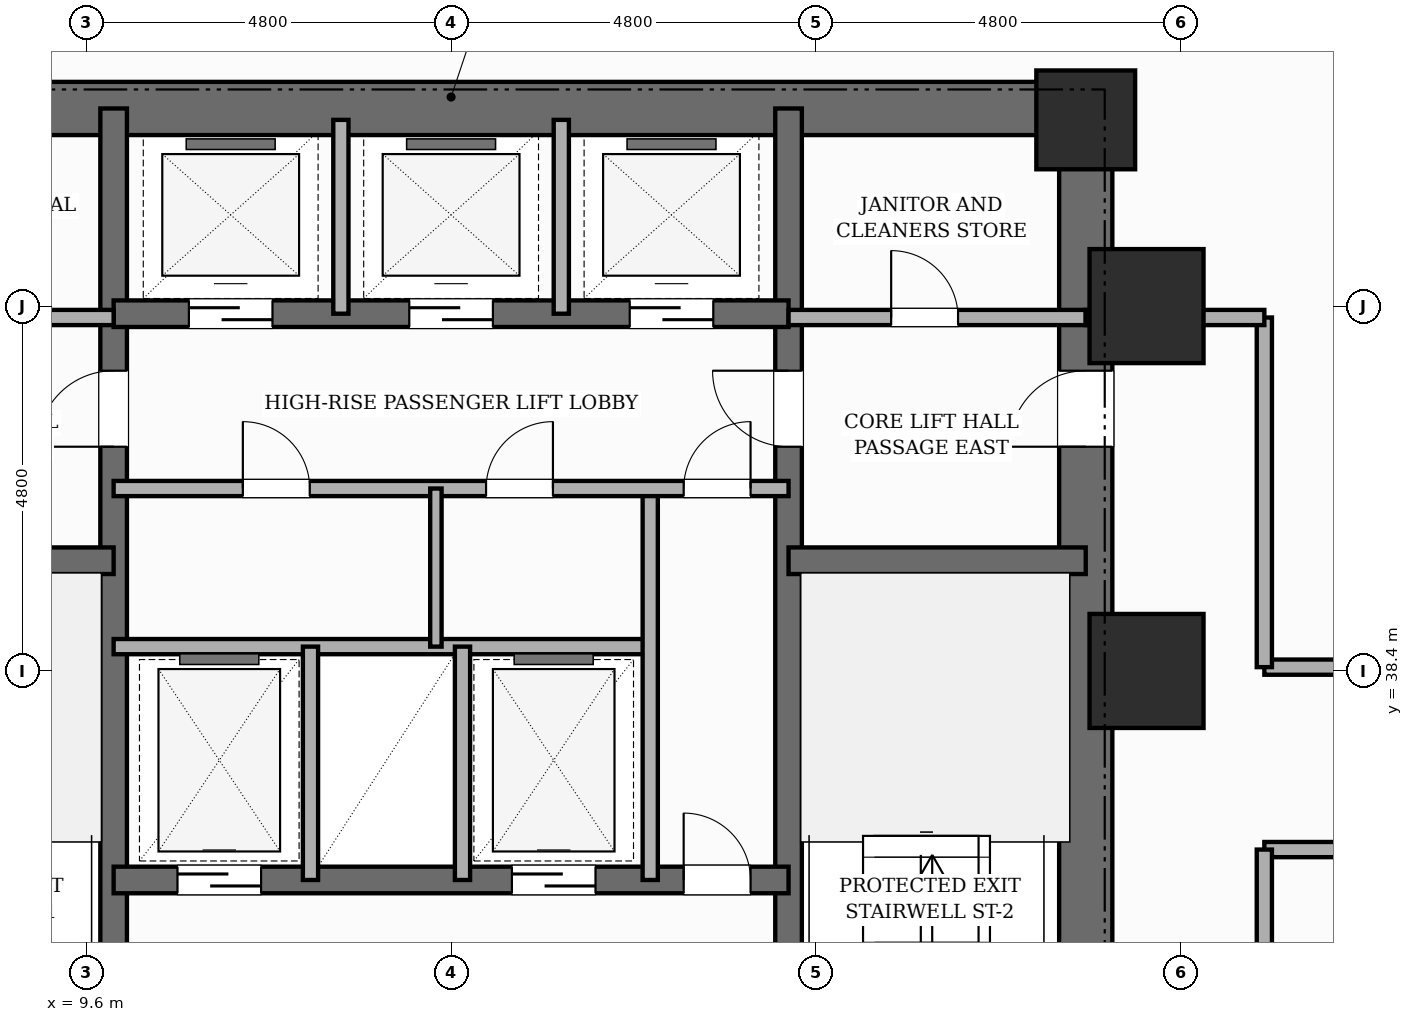
"""IFC4 building model, lengths in metres.
Left out: names, types, materials, properties, quantities, classifications, styles, units other than length and angle.
Written with IfcOpenShell. Run it as: python <this file> out.ifc"""

import sys

from ifc_helpers import new_model, si_unit, direction, frame, frame_2d, origin, origin_2d, place, context, subcontext, project, spatial, rectangle, extrude, element, fill, save


model = new_model("IFC4")
c1 = context("Model", 3, precision=1e-05, world=origin(), true_north=direction((0.0, 1.0)))
c2 = subcontext(c1, "Body", "Model", "MODEL_VIEW")
j1 = project(units=[si_unit("LENGTHUNIT", "METRE"), si_unit("PLANEANGLEUNIT", "RADIAN")], contexts=[c1])
p1 = place(None, origin())
s1 = spatial("IfcSite", under=j1, at=p1, CompositionType="ELEMENT")
p2 = place(p1, origin())
s2 = spatial("IfcBuilding", under=s1, at=p2, CompositionType="ELEMENT")
p3 = place(p2, frame((0.0, 0.0, -8.8)))
s3 = spatial("IfcBuildingStorey", under=s2, at=p3, CompositionType="ELEMENT", Elevation=-8.8)
p4 = place(p3, frame((22.75, 30.55, 0.0), z_axis=(0.0, 0.0, 1.0), x_axis=(0.0, 1.0, 0.0)))
e1 = element("IfcWall", 1, at=p4, inside=s3, PredefinedType="SHEAR", context=c2, shape_type="SweptSolid", body=[
    extrude(rectangle(XDim=15.6, YDim=0.7, at=frame_2d((7.8, 0.0))), origin(), (0.0, 0.0, 1.0), 4.4),
])
p5 = place(p4, frame((10.8, 0.0, 0.0)))
e2 = element("IfcOpeningElement", 2, at=p5, cuts=e1, PredefinedType="OPENING", context=c2, shape_type="SweptSolid", body=[
    extrude(rectangle(XDim=1.0, YDim=2.15, at=frame_2d((0.5, 1.075))), frame((0.0, 0.36, 0.0), z_axis=(0.0, -1.0, 0.0), x_axis=(1.0, 0.0, 0.0)), (0.0, 0.0, 1.0), 0.72),
])
p6 = place(p3, frame((6.05, 45.8, 0.0), z_axis=(0.0, 0.0, 1.0), x_axis=(1.0, 0.0, 0.0)))
e3 = element("IfcWall", 3, at=p6, inside=s3, PredefinedType="SHEAR", context=c2, shape_type="SweptSolid", body=[
    extrude(rectangle(XDim=16.7, YDim=0.7, at=frame_2d((8.35, 0.0))), origin(), (0.0, 0.0, 1.0), 4.4),
])
p7 = place(p3, frame((9.96, 30.9, 0.0), z_axis=(0.0, 0.0, 1.0), x_axis=(0.0, 1.0, 0.0)))
e4 = element("IfcWall", 4, at=p7, inside=s3, PredefinedType="SHEAR", context=c2, shape_type="SweptSolid", body=[
    extrude(rectangle(XDim=14.9, YDim=0.35, at=frame_2d((7.45, 0.0))), origin(), (0.0, 0.0, 1.0), 4.4),
])
p8 = place(p7, frame((0.65, 0.0, 0.0)))
e5 = element("IfcOpeningElement", 5, at=p8, cuts=e4, PredefinedType="OPENING", context=c2, shape_type="SweptSolid", body=[
    extrude(rectangle(XDim=0.95, YDim=2.1, at=frame_2d((0.475, 1.05))), frame((0.0, 0.185, 0.0), z_axis=(0.0, -1.0, 0.0), x_axis=(1.0, 0.0, 0.0)), (0.0, 0.0, 1.0), 0.37),
])
p9 = place(p7, frame((10.45, 0.0, 0.0)))
e6 = element("IfcOpeningElement", 6, at=p9, cuts=e4, PredefinedType="OPENING", context=c2, shape_type="SweptSolid", body=[
    extrude(rectangle(XDim=1.0, YDim=2.15, at=frame_2d((0.5, 1.075))), frame((0.0, 0.185, 0.0), z_axis=(0.0, -1.0, 0.0), x_axis=(1.0, 0.0, 0.0)), (0.0, 0.0, 1.0), 0.37),
])
p10 = place(p3, frame((18.84, 30.9, 0.0), z_axis=(0.0, 0.0, 1.0), x_axis=(0.0, 1.0, 0.0)))
e7 = element("IfcWall", 7, at=p10, inside=s3, PredefinedType="SHEAR", context=c2, shape_type="SweptSolid", body=[
    extrude(rectangle(XDim=14.9, YDim=0.35, at=frame_2d((7.45, 0.0))), origin(), (0.0, 0.0, 1.0), 4.4),
])
p11 = place(p10, frame((0.65, 0.0, 0.0)))
e8 = element("IfcOpeningElement", 8, at=p11, cuts=e7, PredefinedType="OPENING", context=c2, shape_type="SweptSolid", body=[
    extrude(rectangle(XDim=0.95, YDim=2.1, at=frame_2d((0.475, 1.05))), frame((0.0, 0.185, 0.0), z_axis=(0.0, -1.0, 0.0), x_axis=(1.0, 0.0, 0.0)), (0.0, 0.0, 1.0), 0.37),
])
p12 = place(p10, frame((10.45, 0.0, 0.0)))
e9 = element("IfcOpeningElement", 9, at=p12, cuts=e7, PredefinedType="OPENING", context=c2, shape_type="SweptSolid", body=[
    extrude(rectangle(XDim=1.0, YDim=2.15, at=frame_2d((0.5, 1.075))), frame((0.0, 0.185, 0.0), z_axis=(0.0, -1.0, 0.0), x_axis=(1.0, 0.0, 0.0)), (0.0, 0.0, 1.0), 0.37),
])
for number, where, z_axis, x_axis in (
    (10, (6.05, 39.85, 0.0), (0.0, 0.0, 1.0), (1.0, 0.0, 0.0)),
    (11, (18.84, 39.85, 0.0), (0.0, 0.0, 1.0), (1.0, 0.0, 0.0)),
):
    element("IfcWall", number, at=place(p3, frame(where, z_axis=z_axis, x_axis=x_axis)), inside=s3, PredefinedType="SHEAR", context=c2, shape_type="SweptSolid", body=[
        extrude(rectangle(XDim=3.91, YDim=0.35, at=frame_2d((1.955, 0.0))), origin(), (0.0, 0.0, 1.0), 4.4),
    ])
p13 = place(p3, frame((9.96, 35.65, 0.0), z_axis=(0.0, 0.0, 1.0), x_axis=(1.0, 0.0, 0.0)))
e12 = element("IfcWall", 12, at=p13, inside=s3, PredefinedType="SHEAR", context=c2, shape_type="SweptSolid", body=[
    extrude(rectangle(XDim=8.88, YDim=0.35, at=frame_2d((4.44, 0.0))), origin(), (0.0, 0.0, 1.0), 4.4),
])
p14 = place(p13, frame((0.84, 0.0, 0.0)))
e13 = element("IfcOpeningElement", 13, at=p14, cuts=e12, PredefinedType="OPENING", context=c2, shape_type="SweptSolid", body=[
    extrude(rectangle(XDim=1.1, YDim=2.15, at=frame_2d((0.55, 1.075))), frame((0.0, 0.185, 0.0), z_axis=(0.0, -1.0, 0.0), x_axis=(1.0, 0.0, 0.0)), (0.0, 0.0, 1.0), 0.37),
])
p15 = place(p13, frame((5.24, 0.0, 0.0)))
e14 = element("IfcOpeningElement", 14, at=p15, cuts=e12, PredefinedType="OPENING", context=c2, shape_type="SweptSolid", body=[
    extrude(rectangle(XDim=1.1, YDim=2.15, at=frame_2d((0.55, 1.075))), frame((0.0, 0.185, 0.0), z_axis=(0.0, -1.0, 0.0), x_axis=(1.0, 0.0, 0.0)), (0.0, 0.0, 1.0), 0.37),
])
p16 = place(p13, frame((7.5, 0.0, 0.0)))
e15 = element("IfcOpeningElement", 15, at=p16, cuts=e12, PredefinedType="OPENING", context=c2, shape_type="SweptSolid", body=[
    extrude(rectangle(XDim=0.88, YDim=2.1, at=frame_2d((0.44, 1.05))), frame((0.0, 0.185, 0.0), z_axis=(0.0, -1.0, 0.0), x_axis=(1.0, 0.0, 0.0)), (0.0, 0.0, 1.0), 0.37),
])
p17 = place(p3, frame((9.96, 43.1, 0.0), z_axis=(0.0, 0.0, 1.0), x_axis=(1.0, 0.0, 0.0)))
e16 = element("IfcWall", 16, at=p17, inside=s3, PredefinedType="SHEAR", context=c2, shape_type="SweptSolid", body=[
    extrude(rectangle(XDim=8.88, YDim=0.35, at=frame_2d((4.44, 0.0))), origin(), (0.0, 0.0, 1.0), 4.4),
])
p18 = place(p17, frame((0.99, 0.0, 0.0)))
e17 = element("IfcOpeningElement", 17, at=p18, cuts=e16, PredefinedType="OPENING", context=c2, shape_type="SweptSolid", body=[
    extrude(rectangle(XDim=1.1, YDim=2.15, at=frame_2d((0.55, 1.075))), frame((0.0, 0.185, 0.0), z_axis=(0.0, -1.0, 0.0), x_axis=(1.0, 0.0, 0.0)), (0.0, 0.0, 1.0), 0.37),
])
p19 = place(p17, frame((3.89, 0.0, 0.0)))
e18 = element("IfcOpeningElement", 18, at=p19, cuts=e16, PredefinedType="OPENING", context=c2, shape_type="SweptSolid", body=[
    extrude(rectangle(XDim=1.1, YDim=2.15, at=frame_2d((0.55, 1.075))), frame((0.0, 0.185, 0.0), z_axis=(0.0, -1.0, 0.0), x_axis=(1.0, 0.0, 0.0)), (0.0, 0.0, 1.0), 0.37),
])
p20 = place(p17, frame((6.79, 0.0, 0.0)))
e19 = element("IfcOpeningElement", 19, at=p20, cuts=e16, PredefinedType="OPENING", context=c2, shape_type="SweptSolid", body=[
    extrude(rectangle(XDim=1.1, YDim=2.15, at=frame_2d((0.55, 1.075))), frame((0.0, 0.185, 0.0), z_axis=(0.0, -1.0, 0.0), x_axis=(1.0, 0.0, 0.0)), (0.0, 0.0, 1.0), 0.37),
])
p21 = place(p3, frame((22.75, 45.65, 0.0), z_axis=(0.0, 0.0, 1.0), x_axis=(1.0, 0.0, 0.0)))
e20 = element("IfcColumn", 20, at=p21, inside=s3, PredefinedType="COLUMN", context=c2, shape_type="SweptSolid", body=[
    extrude(rectangle(XDim=1.3, YDim=1.3, at=origin_2d()), origin(), (0.0, 0.0, 1.0), 4.4),
])
for number, where, z_axis, x_axis in (
    (21, (23.55, 38.4, 0.0), (0.0, 0.0, 1.0), (1.0, 0.0, 0.0)),
    (22, (23.55, 43.2, 0.0), (0.0, 0.0, 1.0), (1.0, 0.0, 0.0)),
):
    element("IfcColumn", number, at=place(p3, frame(where, z_axis=z_axis, x_axis=x_axis)), inside=s3, PredefinedType="USERDEFINED", context=c2, shape_type="SweptSolid", body=[
        extrude(rectangle(XDim=1.5, YDim=1.5, at=origin_2d()), origin(), (0.0, 0.0, 1.0), 4.4),
    ])
p22 = place(p3, frame((9.96, 38.72, 0.0), z_axis=(0.0, 0.0, 1.0), x_axis=(1.0, 0.0, 0.0)))
e23 = element("IfcWall", 23, at=p22, inside=s3, PredefinedType="POLYGONAL", context=c2, shape_type="SweptSolid", body=[
    extrude(rectangle(XDim=7.06, YDim=0.2, at=frame_2d((3.53, 0.0))), origin(), (0.0, 0.0, 1.0), 4.08),
])
for number, where, z_axis, x_axis in (
    (24, (12.55, 35.65, 0.0), (0.0, 0.0, 1.0), (0.0, 1.0, 0.0)),
    (25, (14.55, 35.65, 0.0), (0.0, 0.0, 1.0), (0.0, 1.0, 0.0)),
):
    element("IfcWall", number, at=place(p3, frame(where, z_axis=z_axis, x_axis=x_axis)), inside=s3, PredefinedType="POLYGONAL", context=c2, shape_type="SweptSolid", body=[
        extrude(rectangle(XDim=3.07, YDim=0.2, at=frame_2d((1.535, 0.0))), origin(), (0.0, 0.0, 1.0), 4.08),
    ])
p23 = place(p3, frame((17.02, 35.65, 0.0), z_axis=(0.0, 0.0, 1.0), x_axis=(0.0, 1.0, 0.0)))
e26 = element("IfcWall", 26, at=p23, inside=s3, PredefinedType="POLYGONAL", context=c2, shape_type="SweptSolid", body=[
    extrude(rectangle(XDim=5.15, YDim=0.2, at=frame_2d((2.575, 0.0))), origin(), (0.0, 0.0, 1.0), 4.08),
])
p24 = place(p3, frame((9.96, 40.8, 0.0), z_axis=(0.0, 0.0, 1.0), x_axis=(1.0, 0.0, 0.0)))
e27 = element("IfcWall", 27, at=p24, inside=s3, PredefinedType="POLYGONAL", context=c2, shape_type="SweptSolid", body=[
    extrude(rectangle(XDim=8.88, YDim=0.2, at=frame_2d((4.44, 0.0))), origin(), (0.0, 0.0, 1.0), 4.08),
])
p25 = place(p24, frame((7.5, 0.0, 0.0)))
e28 = element("IfcOpeningElement", 28, at=p25, cuts=e27, PredefinedType="OPENING", context=c2, shape_type="SweptSolid", body=[
    extrude(rectangle(XDim=0.88, YDim=2.1, at=frame_2d((0.44, 1.05))), frame((0.0, 0.11, 0.0), z_axis=(0.0, -1.0, 0.0), x_axis=(1.0, 0.0, 0.0)), (0.0, 0.0, 1.0), 0.22),
])
p26 = place(p24, frame((1.7, 0.0, 0.0)))
e29 = element("IfcOpeningElement", 29, at=p26, cuts=e27, PredefinedType="OPENING", context=c2, shape_type="SweptSolid", body=[
    extrude(rectangle(XDim=0.88, YDim=2.1, at=frame_2d((0.44, 1.05))), frame((0.0, 0.11, 0.0), z_axis=(0.0, -1.0, 0.0), x_axis=(1.0, 0.0, 0.0)), (0.0, 0.0, 1.0), 0.22),
])
p27 = place(p24, frame((4.9, 0.0, 0.0)))
e30 = element("IfcOpeningElement", 30, at=p27, cuts=e27, PredefinedType="OPENING", context=c2, shape_type="SweptSolid", body=[
    extrude(rectangle(XDim=0.88, YDim=2.1, at=frame_2d((0.44, 1.05))), frame((0.0, 0.11, 0.0), z_axis=(0.0, -1.0, 0.0), x_axis=(1.0, 0.0, 0.0)), (0.0, 0.0, 1.0), 0.22),
])
p28 = place(p3, frame((18.84, 43.05, 0.0), z_axis=(0.0, 0.0, 1.0), x_axis=(1.0, 0.0, 0.0)))
e31 = element("IfcWall", 31, at=p28, inside=s3, PredefinedType="POLYGONAL", context=c2, shape_type="SweptSolid", body=[
    extrude(rectangle(XDim=3.91, YDim=0.2, at=frame_2d((1.955, 0.0))), origin(), (0.0, 0.0, 1.0), 3.28),
])
p29 = place(p28, frame((1.35, 0.0, 0.0)))
e32 = element("IfcOpeningElement", 32, at=p29, cuts=e31, PredefinedType="OPENING", context=c2, shape_type="SweptSolid", body=[
    extrude(rectangle(XDim=0.88, YDim=2.1, at=frame_2d((0.44, 1.05))), frame((0.0, 0.11, 0.0), z_axis=(0.0, -1.0, 0.0), x_axis=(1.0, 0.0, 0.0)), (0.0, 0.0, 1.0), 0.22),
])
p30 = place(p3, frame((6.05, 43.05, 0.0), z_axis=(0.0, 0.0, 1.0), x_axis=(1.0, 0.0, 0.0)))
e33 = element("IfcWall", 33, at=p30, inside=s3, PredefinedType="POLYGONAL", context=c2, shape_type="SweptSolid", body=[
    extrude(rectangle(XDim=3.91, YDim=0.2, at=frame_2d((1.955, 0.0))), origin(), (0.0, 0.0, 1.0), 3.28),
])
p31 = place(p30, frame((1.35, 0.0, 0.0)))
e34 = element("IfcOpeningElement", 34, at=p31, cuts=e33, PredefinedType="OPENING", context=c2, shape_type="SweptSolid", body=[
    extrude(rectangle(XDim=0.88, YDim=2.1, at=frame_2d((0.44, 1.05))), frame((0.0, 0.11, 0.0), z_axis=(0.0, -1.0, 0.0), x_axis=(1.0, 0.0, 0.0)), (0.0, 0.0, 1.0), 0.22),
])
for number, where, z_axis, x_axis in (
    (35, (12.95, 43.1, 0.0), (0.0, 0.0, 1.0), (0.0, 1.0, 0.0)),
    (36, (15.85, 43.1, 0.0), (0.0, 0.0, 1.0), (0.0, 1.0, 0.0)),
):
    element("IfcWall", number, at=place(p3, frame(where, z_axis=z_axis, x_axis=x_axis)), inside=s3, PredefinedType="POLYGONAL", context=c2, shape_type="SweptSolid", body=[
        extrude(rectangle(XDim=2.55, YDim=0.2, at=frame_2d((1.275, 0.0))), origin(), (0.0, 0.0, 1.0), 4.08),
    ])
p32 = place(p3, frame((14.2, 38.72, 0.0), z_axis=(0.0, 0.0, 1.0), x_axis=(0.0, 1.0, 0.0)))
e37 = element("IfcWall", 37, at=p32, inside=s3, PredefinedType="PARTITIONING", context=c2, shape_type="SweptSolid", body=[
    extrude(rectangle(XDim=2.08, YDim=0.15, at=frame_2d((1.04, 0.0))), origin(), (0.0, 0.0, 1.0), 4.08),
])
p33 = place(p3, frame((25.1, 36.05, 0.0), z_axis=(0.0, 0.0, 1.0), x_axis=(1.0, 0.0, 0.0)))
e38 = element("IfcWall", 38, at=p33, inside=s3, PredefinedType="PARTITIONING", context=c2, shape_type="SweptSolid", body=[
    extrude(rectangle(XDim=18.92, YDim=0.2, at=frame_2d((9.46, 0.0))), origin(), (0.0, 0.0, 1.0), 4.08),
])
p34 = place(p33, frame((4.2, 0.0, 0.0)))
e39 = element("IfcOpeningElement", 39, at=p34, cuts=e38, PredefinedType="OPENING", context=c2, shape_type="SweptSolid", body=[
    extrude(rectangle(XDim=1.0, YDim=2.15, at=frame_2d((0.5, 1.075))), frame((0.0, 0.11, 0.0), z_axis=(0.0, -1.0, 0.0), x_axis=(1.0, 0.0, 0.0)), (0.0, 0.0, 1.0), 0.22),
])
p35 = place(p3, frame((25.1, 38.45, 0.0), z_axis=(0.0, 0.0, 1.0), x_axis=(1.0, 0.0, 0.0)))
e40 = element("IfcWall", 40, at=p35, inside=s3, PredefinedType="PARTITIONING", context=c2, shape_type="SweptSolid", body=[
    extrude(rectangle(XDim=18.92, YDim=0.2, at=frame_2d((9.46, 0.0))), origin(), (0.0, 0.0, 1.0), 4.08),
])
p36 = place(p35, frame((5.2, 0.0, 0.0)))
e41 = element("IfcOpeningElement", 41, at=p36, cuts=e40, PredefinedType="OPENING", context=c2, shape_type="SweptSolid", body=[
    extrude(rectangle(XDim=1.0, YDim=2.15, at=frame_2d((0.5, 1.075))), frame((0.0, 0.11, 0.0), z_axis=(0.0, -1.0, 0.0), x_axis=(1.0, 0.0, 0.0)), (0.0, 0.0, 1.0), 0.22),
])
p37 = place(p35, frame((12.9, 0.0, 0.0)))
e42 = element("IfcOpeningElement", 42, at=p37, cuts=e40, PredefinedType="OPENING", context=c2, shape_type="SweptSolid", body=[
    extrude(rectangle(XDim=1.0, YDim=2.15, at=frame_2d((0.5, 1.075))), frame((0.0, 0.11, 0.0), z_axis=(0.0, -1.0, 0.0), x_axis=(1.0, 0.0, 0.0)), (0.0, 0.0, 1.0), 0.22),
])
p38 = place(p3, frame((25.1, 25.8, 0.0), z_axis=(0.0, 0.0, 1.0), x_axis=(0.0, 1.0, 0.0)))
e43 = element("IfcWall", 43, at=p38, inside=s3, PredefinedType="PARTITIONING", context=c2, shape_type="SweptSolid", body=[
    extrude(rectangle(XDim=10.25, YDim=0.2, at=frame_2d((5.125, 0.0))), origin(), (0.0, 0.0, 1.0), 4.08),
])
p39 = place(p3, frame((25.1, 38.45, 0.0), z_axis=(0.0, 0.0, 1.0), x_axis=(0.0, 1.0, 0.0)))
e44 = element("IfcWall", 44, at=p39, inside=s3, PredefinedType="PARTITIONING", context=c2, shape_type="SweptSolid", body=[
    extrude(rectangle(XDim=4.6, YDim=0.2, at=frame_2d((2.3, 0.0))), origin(), (0.0, 0.0, 1.0), 4.08),
])
p40 = place(p3, frame((22.75, 43.05, 0.0), z_axis=(0.0, 0.0, 1.0), x_axis=(1.0, 0.0, 0.0)))
e45 = element("IfcWall", 45, at=p40, inside=s3, PredefinedType="PARTITIONING", context=c2, shape_type="SweptSolid", body=[
    extrude(rectangle(XDim=2.35, YDim=0.2, at=frame_2d((1.175, 0.0))), origin(), (0.0, 0.0, 1.0), 3.28),
])
p41 = place(p14, origin())
e46 = element("IfcDoor", 46, at=p41, inside=s3, OperationType="SLIDING_TO_LEFT", PredefinedType="DOOR", context=c2, shape_type="SweptSolid", body=[
    extrude(rectangle(XDim=1.1, YDim=2.15, at=frame_2d((0.55, 1.075))), frame((0.0, 0.025, 0.0), z_axis=(0.0, -1.0, 0.0), x_axis=(1.0, 0.0, 0.0)), (0.0, 0.0, 1.0), 0.05),
])
fill(e13, e46)
p42 = place(p15, origin())
e47 = element("IfcDoor", 47, at=p42, inside=s3, OperationType="SLIDING_TO_RIGHT", PredefinedType="DOOR", context=c2, shape_type="SweptSolid", body=[
    extrude(rectangle(XDim=1.1, YDim=2.15, at=frame_2d((0.55, 1.075))), frame((0.0, 0.025, 0.0), z_axis=(0.0, -1.0, 0.0), x_axis=(1.0, 0.0, 0.0)), (0.0, 0.0, 1.0), 0.05),
])
fill(e14, e47)
p43 = place(p16, origin())
e48 = element("IfcDoor", 48, at=p43, inside=s3, OperationType="SINGLE_SWING_LEFT", PredefinedType="DOOR", context=c2, shape_type="SweptSolid", body=[
    extrude(rectangle(XDim=0.88, YDim=2.1, at=frame_2d((0.44, 1.05))), frame((0.0, 0.025, 0.0), z_axis=(0.0, -1.0, 0.0), x_axis=(1.0, 0.0, 0.0)), (0.0, 0.0, 1.0), 0.05),
])
fill(e15, e48)
p44 = place(p25, origin())
e49 = element("IfcDoor", 49, at=p44, inside=s3, OperationType="SINGLE_SWING_RIGHT", PredefinedType="DOOR", context=c2, shape_type="SweptSolid", body=[
    extrude(rectangle(XDim=0.88, YDim=2.1, at=frame_2d((0.44, 1.05))), frame((0.0, 0.025, 0.0), z_axis=(0.0, -1.0, 0.0), x_axis=(1.0, 0.0, 0.0)), (0.0, 0.0, 1.0), 0.05),
])
fill(e28, e49)
p45 = place(p18, origin())
e50 = element("IfcDoor", 50, at=p45, inside=s3, OperationType="SLIDING_TO_LEFT", PredefinedType="DOOR", context=c2, shape_type="SweptSolid", body=[
    extrude(rectangle(XDim=1.1, YDim=2.15, at=frame_2d((0.55, 1.075))), frame((0.0, 0.025, 0.0), z_axis=(0.0, -1.0, 0.0), x_axis=(1.0, 0.0, 0.0)), (0.0, 0.0, 1.0), 0.05),
])
fill(e17, e50)
p46 = place(p19, origin())
e51 = element("IfcDoor", 51, at=p46, inside=s3, OperationType="SLIDING_TO_RIGHT", PredefinedType="DOOR", context=c2, shape_type="SweptSolid", body=[
    extrude(rectangle(XDim=1.1, YDim=2.15, at=frame_2d((0.55, 1.075))), frame((0.0, 0.025, 0.0), z_axis=(0.0, -1.0, 0.0), x_axis=(1.0, 0.0, 0.0)), (0.0, 0.0, 1.0), 0.05),
])
fill(e18, e51)
p47 = place(p20, origin())
e52 = element("IfcDoor", 52, at=p47, inside=s3, OperationType="SLIDING_TO_LEFT", PredefinedType="DOOR", context=c2, shape_type="SweptSolid", body=[
    extrude(rectangle(XDim=1.1, YDim=2.15, at=frame_2d((0.55, 1.075))), frame((0.0, 0.025, 0.0), z_axis=(0.0, -1.0, 0.0), x_axis=(1.0, 0.0, 0.0)), (0.0, 0.0, 1.0), 0.05),
])
fill(e19, e52)
p48 = place(p9, origin())
e53 = element("IfcDoor", 53, at=p48, inside=s3, OperationType="SINGLE_SWING_LEFT", PredefinedType="DOOR", context=c2, shape_type="SweptSolid", body=[
    extrude(rectangle(XDim=1.0, YDim=2.15, at=frame_2d((0.5, 1.075))), frame((0.0, 0.025, 0.0), z_axis=(0.0, -1.0, 0.0), x_axis=(1.0, 0.0, 0.0)), (0.0, 0.0, 1.0), 0.05),
])
fill(e6, e53)
p49 = place(p12, origin())
e54 = element("IfcDoor", 54, at=p49, inside=s3, OperationType="SINGLE_SWING_RIGHT", PredefinedType="DOOR", context=c2, shape_type="SweptSolid", body=[
    extrude(rectangle(XDim=1.0, YDim=2.15, at=frame_2d((0.5, 1.075))), frame((0.0, 0.025, 0.0), z_axis=(0.0, -1.0, 0.0), x_axis=(1.0, 0.0, 0.0)), (0.0, 0.0, 1.0), 0.05),
])
fill(e9, e54)
p50 = place(p5, origin())
e55 = element("IfcDoor", 55, at=p50, inside=s3, OperationType="SINGLE_SWING_LEFT", PredefinedType="DOOR", context=c2, shape_type="SweptSolid", body=[
    extrude(rectangle(XDim=1.0, YDim=2.15, at=frame_2d((0.5, 1.075))), frame((0.0, 0.025, 0.0), z_axis=(0.0, -1.0, 0.0), x_axis=(1.0, 0.0, 0.0)), (0.0, 0.0, 1.0), 0.05),
])
fill(e2, e55)
p51 = place(p26, origin())
e56 = element("IfcDoor", 56, at=p51, inside=s3, OperationType="SINGLE_SWING_LEFT", PredefinedType="DOOR", context=c2, shape_type="SweptSolid", body=[
    extrude(rectangle(XDim=0.88, YDim=2.1, at=frame_2d((0.44, 1.05))), frame((0.0, 0.025, 0.0), z_axis=(0.0, -1.0, 0.0), x_axis=(1.0, 0.0, 0.0)), (0.0, 0.0, 1.0), 0.05),
])
fill(e29, e56)
p52 = place(p27, origin())
e57 = element("IfcDoor", 57, at=p52, inside=s3, OperationType="SINGLE_SWING_RIGHT", PredefinedType="DOOR", context=c2, shape_type="SweptSolid", body=[
    extrude(rectangle(XDim=0.88, YDim=2.1, at=frame_2d((0.44, 1.05))), frame((0.0, 0.025, 0.0), z_axis=(0.0, -1.0, 0.0), x_axis=(1.0, 0.0, 0.0)), (0.0, 0.0, 1.0), 0.05),
])
fill(e30, e57)
p53 = place(p29, origin())
e58 = element("IfcDoor", 58, at=p53, inside=s3, OperationType="SINGLE_SWING_LEFT", PredefinedType="DOOR", context=c2, shape_type="SweptSolid", body=[
    extrude(rectangle(XDim=0.88, YDim=2.1, at=frame_2d((0.44, 1.05))), frame((0.0, 0.025, 0.0), z_axis=(0.0, -1.0, 0.0), x_axis=(1.0, 0.0, 0.0)), (0.0, 0.0, 1.0), 0.05),
])
fill(e32, e58)
save(model, sys.argv[1])
